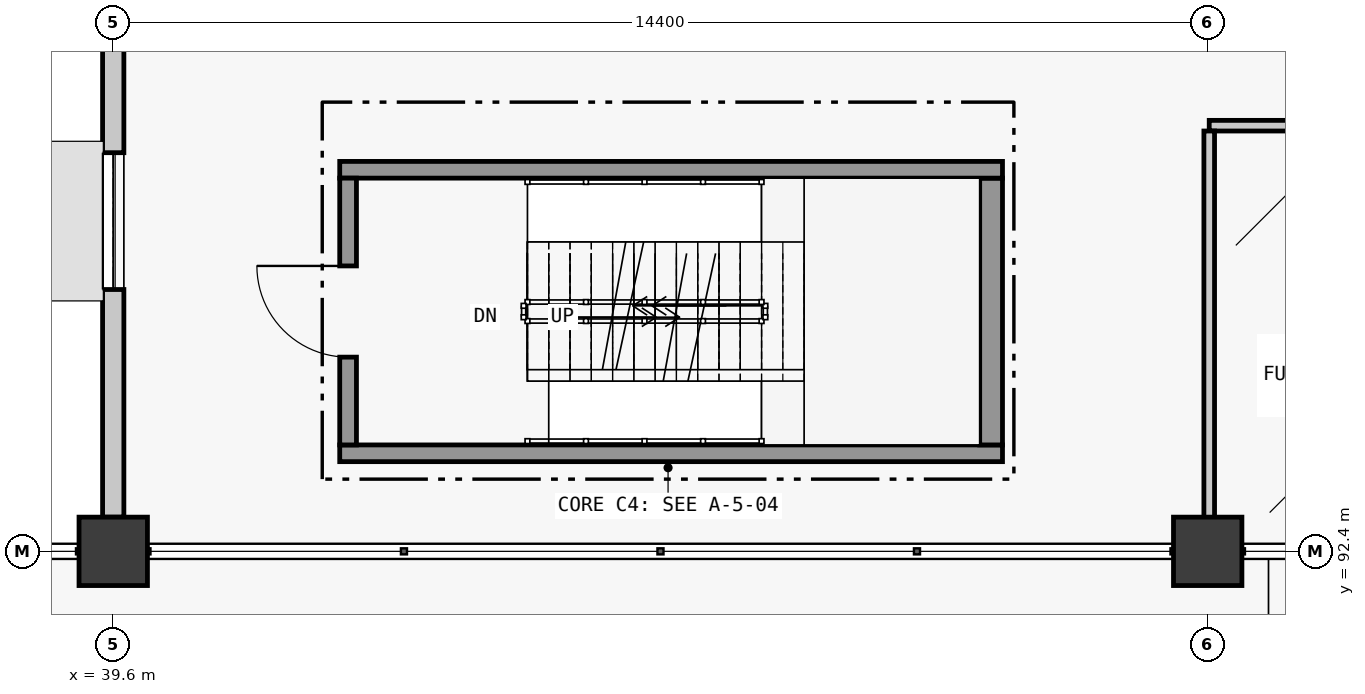
"""IFC4 building model, lengths in metres.
Left out: names, types, materials, properties, quantities, classifications, styles, units other than length and angle.
Written with IfcOpenShell. Run it as: python <this file> out.ifc"""

import sys

from ifc_helpers import new_model, si_unit, direction, frame, frame_2d, origin, origin_2d, place, context, subcontext, project, spatial, rectangle, extrude, element, fill, save


model = new_model("IFC4")
c1 = context("Model", 3, precision=1e-05, world=origin(), true_north=direction((0.0, 1.0)))
c2 = subcontext(c1, "Body", "Model", "MODEL_VIEW")
j1 = project(units=[si_unit("LENGTHUNIT", "METRE"), si_unit("PLANEANGLEUNIT", "RADIAN")], contexts=[c1])
p1 = place(None, origin())
s1 = spatial("IfcSite", under=j1, at=p1, CompositionType="ELEMENT")
p2 = place(p1, origin())
s2 = spatial("IfcBuilding", under=s1, at=p2, CompositionType="ELEMENT")
p3 = place(p2, frame((0.0, 0.0, 4.8)))
s3 = spatial("IfcBuildingStorey", under=s2, at=p3, CompositionType="ELEMENT", Elevation=4.8)
for number, where, z_axis, x_axis in (
    (1, (39.6, 92.4, 0.0), (0.0, 0.0, 1.0), (1.0, 0.0, 0.0)),
    (2, (54.0, 92.4, 0.0), (0.0, 0.0, 1.0), (1.0, 0.0, 0.0)),
):
    element("IfcColumn", number, at=place(p3, frame(where, z_axis=z_axis, x_axis=x_axis)), inside=s3, PredefinedType="COLUMN", context=c2, shape_type="SweptSolid", body=[
        extrude(rectangle(XDim=0.9, YDim=0.9, at=origin_2d()), origin(), (0.0, 0.0, 1.0), 4.2),
    ])
p4 = place(p3, frame((39.6, 100.64, 0.0), z_axis=(0.0, 0.0, 1.0), x_axis=(0.0, -1.0, 0.0)))
e3 = element("IfcWall", 3, at=p4, inside=s3, PredefinedType="STANDARD", context=c2, shape_type="SweptSolid", body=[
    extrude(rectangle(XDim=7.79, YDim=0.28, at=frame_2d((3.895, 0.0))), origin(), (0.0, 0.0, 1.0), 3.396),
])
p5 = place(p4, frame((2.995, 0.0, 0.9)))
e4 = element("IfcOpeningElement", 4, at=p5, cuts=e3, PredefinedType="OPENING", context=c2, shape_type="SweptSolid", body=[
    extrude(rectangle(XDim=1.8, YDim=1.8, at=frame_2d((0.9, 0.9))), frame((0.0, 0.155, 0.0), z_axis=(0.0, -1.0, 0.0), x_axis=(1.0, 0.0, 0.0)), (0.0, 0.0, 1.0), 0.31),
])
p6 = place(p3, frame((42.58, 93.69, 0.0), z_axis=(0.0, 0.0, 1.0), x_axis=(1.0, 0.0, 0.0)))
e5 = element("IfcWall", 5, at=p6, inside=s3, PredefinedType="SOLIDWALL", context=c2, shape_type="SweptSolid", body=[
    extrude(rectangle(XDim=8.72, YDim=0.22, at=frame_2d((4.36, 0.0))), origin(), (0.0, 0.0, 1.0), 3.94),
])
p7 = place(p3, frame((51.15, 93.8, 0.0), z_axis=(0.0, 0.0, 1.0), x_axis=(0.0, 1.0, 0.0)))
e6 = element("IfcWall", 6, at=p7, inside=s3, PredefinedType="SHEAR", context=c2, shape_type="SweptSolid", body=[
    extrude(rectangle(XDim=3.51, YDim=0.3, at=frame_2d((1.755, 0.0))), origin(), (0.0, 0.0, 1.0), 3.94),
])
p8 = place(p3, frame((51.3, 97.42, 0.0), z_axis=(0.0, 0.0, 1.0), x_axis=(-1.0, 0.0, 0.0)))
e7 = element("IfcWall", 7, at=p8, inside=s3, PredefinedType="SOLIDWALL", context=c2, shape_type="SweptSolid", body=[
    extrude(rectangle(XDim=8.72, YDim=0.22, at=frame_2d((4.36, 0.0))), origin(), (0.0, 0.0, 1.0), 3.94),
])
p9 = place(p3, frame((42.69, 97.31, 0.0), z_axis=(0.0, 0.0, 1.0), x_axis=(0.0, -1.0, 0.0)))
e8 = element("IfcWall", 8, at=p9, inside=s3, PredefinedType="SOLIDWALL", context=c2, shape_type="SweptSolid", body=[
    extrude(rectangle(XDim=3.51, YDim=0.22, at=frame_2d((1.755, 0.0))), origin(), (0.0, 0.0, 1.0), 3.94),
])
p10 = place(p9, frame((1.155, 0.0, 0.0)))
e9 = element("IfcOpeningElement", 9, at=p10, cuts=e8, PredefinedType="OPENING", context=c2, shape_type="SweptSolid", body=[
    extrude(rectangle(XDim=1.2, YDim=2.2, at=frame_2d((0.6, 1.1))), frame((0.0, 0.125, 0.0), z_axis=(0.0, -1.0, 0.0), x_axis=(1.0, 0.0, 0.0)), (0.0, 0.0, 1.0), 0.25),
])
p11 = place(p3, frame((54.02, 98.0, 0.0), z_axis=(0.0, 0.0, 1.0), x_axis=(1.0, 0.0, 0.0)))
e10 = element("IfcWall", 10, at=p11, inside=s3, PredefinedType="PARTITIONING", context=c2, shape_type="SweptSolid", body=[
    extrude(rectangle(XDim=32.38, YDim=0.14, at=frame_2d((16.19, 0.0))), origin(), (0.0, 0.0, 1.0), 3.94),
])
p12 = place(p11, frame((3.71, 0.0, 0.0)))
e11 = element("IfcOpeningElement", 11, at=p12, cuts=e10, PredefinedType="OPENING", context=c2, shape_type="SweptSolid", body=[
    extrude(rectangle(XDim=1.6, YDim=2.2, at=frame_2d((0.8, 1.1))), frame((0.0, 0.085, 0.0), z_axis=(0.0, -1.0, 0.0), x_axis=(1.0, 0.0, 0.0)), (0.0, 0.0, 1.0), 0.17),
])
p13 = place(p3, frame((54.02, 92.56, 0.0), z_axis=(0.0, 0.0, 1.0), x_axis=(0.0, 1.0, 0.0)))
e12 = element("IfcWall", 12, at=p13, inside=s3, PredefinedType="PARTITIONING", context=c2, shape_type="SweptSolid", body=[
    extrude(rectangle(XDim=5.37, YDim=0.14, at=frame_2d((2.685, 0.0))), origin(), (0.0, 0.0, 1.0), 3.074),
])
p14 = place(p5, origin())
e13 = element("IfcWindow", 13, at=p14, inside=s3, PartitioningType="SINGLE_PANEL", PredefinedType="WINDOW", context=c2, shape_type="SweptSolid", body=[
    extrude(rectangle(XDim=1.8, YDim=1.8, at=frame_2d((0.9, 0.9))), frame((0.0, 0.03, 0.0), z_axis=(0.0, -1.0, 0.0), x_axis=(1.0, 0.0, 0.0)), (0.0, 0.0, 1.0), 0.06),
])
fill(e4, e13)
p15 = place(p10, frame((1.2, 0.0, 0.0), z_axis=(0.0, 0.0, 1.0), x_axis=(-1.0, 0.0, 0.0)))
e14 = element("IfcDoor", 14, at=p15, inside=s3, OperationType="SINGLE_SWING_LEFT", PredefinedType="DOOR", context=c2, shape_type="SweptSolid", body=[
    extrude(rectangle(XDim=1.2, YDim=2.2, at=frame_2d((0.6, 1.1))), frame((0.0, 0.025, 0.0), z_axis=(0.0, -1.0, 0.0), x_axis=(1.0, 0.0, 0.0)), (0.0, 0.0, 1.0), 0.05),
])
fill(e9, e14)
save(model, sys.argv[1])
